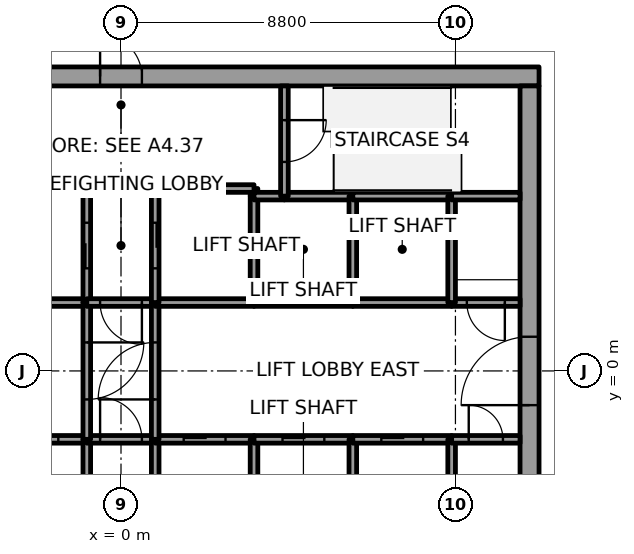
"""IFC4 building model, lengths in metres.
Left out: names, types, materials, properties, quantities, classifications, styles, units other than length and angle.
Written with IfcOpenShell. Run it as: python <this file> out.ifc"""

import sys

from ifc_helpers import new_model, si_unit, direction, frame, frame_2d, origin, place, context, subcontext, project, spatial, rectangle, extrude, element, fill, save


model = new_model("IFC4")
c1 = context("Model", 3, precision=1e-05, world=origin(), true_north=direction((0.0, 1.0)))
c2 = subcontext(c1, "Body", "Model", "MODEL_VIEW")
j1 = project(units=[si_unit("LENGTHUNIT", "METRE"), si_unit("PLANEANGLEUNIT", "RADIAN")], contexts=[c1])
p1 = place(None, origin())
s1 = spatial("IfcSite", under=j1, at=p1, CompositionType="ELEMENT")
p2 = place(p1, origin())
s2 = spatial("IfcBuilding", under=s1, at=p2, CompositionType="ELEMENT")
p3 = place(p2, frame((0.0, 0.0, 161.8)))
s3 = spatial("IfcBuildingStorey", under=s2, at=p3, CompositionType="ELEMENT", Elevation=161.8)
p4 = place(p3, frame((-11.0, 7.75, 0.0), z_axis=(0.0, 0.0, 1.0), x_axis=(1.0, 0.0, 0.0)))
e1 = element("IfcWall", 1, at=p4, inside=s3, PredefinedType="SHEAR", context=c2, shape_type="SweptSolid", body=[
    extrude(rectangle(XDim=22.0, YDim=0.5, at=frame_2d((11.0, 0.0))), origin(), (0.0, 0.0, 1.0), 4.0),
])
p5 = place(p4, frame((10.45, 0.0, 0.0)))
e2 = element("IfcOpeningElement", 2, at=p5, cuts=e1, PredefinedType="OPENING", context=c2, shape_type="SweptSolid", body=[
    extrude(rectangle(XDim=1.1, YDim=2.1, at=frame_2d((0.55, 1.05))), frame((0.0, 0.25, 0.0), z_axis=(0.0, -1.0, 0.0), x_axis=(1.0, 0.0, 0.0)), (0.0, 0.0, 1.0), 0.5),
])
p6 = place(p3, frame((10.75, -7.5, 0.0), z_axis=(0.0, 0.0, 1.0), x_axis=(0.0, 1.0, 0.0)))
e3 = element("IfcWall", 3, at=p6, inside=s3, PredefinedType="SHEAR", context=c2, shape_type="SweptSolid", body=[
    extrude(rectangle(XDim=15.0, YDim=0.5, at=frame_2d((7.5, 0.0))), origin(), (0.0, 0.0, 1.0), 4.0),
])
p7 = place(p6, frame((6.6, 0.0, 0.0)))
e4 = element("IfcOpeningElement", 4, at=p7, cuts=e3, PredefinedType="OPENING", context=c2, shape_type="SweptSolid", body=[
    extrude(rectangle(XDim=1.8, YDim=2.1, at=frame_2d((0.9, 1.05))), frame((0.0, 0.25, 0.0), z_axis=(0.0, -1.0, 0.0), x_axis=(1.0, 0.0, 0.0)), (0.0, 0.0, 1.0), 0.5),
])
p8 = place(p3, frame((-3.5, -1.8, 0.0), z_axis=(0.0, 0.0, 1.0), x_axis=(1.0, 0.0, 0.0)))
e5 = element("IfcWall", 5, at=p8, inside=s3, PredefinedType="SOLIDWALL", context=c2, shape_type="SweptSolid", body=[
    extrude(rectangle(XDim=2.6, YDim=0.2, at=frame_2d((1.3, 0.0))), origin(), (0.0, 0.0, 1.0), 3.85),
])
p9 = place(p8, frame((0.75, 0.0, 0.0)))
e6 = element("IfcOpeningElement", 6, at=p9, cuts=e5, PredefinedType="OPENING", context=c2, shape_type="SweptSolid", body=[
    extrude(rectangle(XDim=1.1, YDim=2.1, at=frame_2d((0.55, 1.05))), frame((0.0, 0.1, 0.0), z_axis=(0.0, -1.0, 0.0), x_axis=(1.0, 0.0, 0.0)), (0.0, 0.0, 1.0), 0.2),
])
p10 = place(p3, frame((-0.9, 1.8, 0.0), z_axis=(0.0, 0.0, 1.0), x_axis=(-1.0, 0.0, 0.0)))
e7 = element("IfcWall", 7, at=p10, inside=s3, PredefinedType="SOLIDWALL", context=c2, shape_type="SweptSolid", body=[
    extrude(rectangle(XDim=2.6, YDim=0.2, at=frame_2d((1.3, 0.0))), origin(), (0.0, 0.0, 1.0), 3.85),
])
p11 = place(p3, frame((-0.9, 1.8, 0.0), z_axis=(0.0, 0.0, 1.0), x_axis=(0.0, 1.0, 0.0)))
e8 = element("IfcWall", 8, at=p11, inside=s3, PredefinedType="SOLIDWALL", context=c2, shape_type="SweptSolid", body=[
    extrude(rectangle(XDim=3.0, YDim=0.2, at=frame_2d((1.5, 0.0))), origin(), (0.0, 0.0, 1.0), 3.85),
])
p12 = place(p11, frame((0.9, 0.0, 0.0)))
e9 = element("IfcOpeningElement", 9, at=p12, cuts=e8, PredefinedType="OPENING", context=c2, shape_type="SweptSolid", body=[
    extrude(rectangle(XDim=1.2, YDim=2.1, at=frame_2d((0.6, 1.05))), frame((0.0, 0.1, 0.0), z_axis=(0.0, -1.0, 0.0), x_axis=(1.0, 0.0, 0.0)), (0.0, 0.0, 1.0), 0.2),
])
p13 = place(p3, frame((-0.9, 4.8, 0.0), z_axis=(0.0, 0.0, 1.0), x_axis=(-1.0, 0.0, 0.0)))
e10 = element("IfcWall", 10, at=p13, inside=s3, PredefinedType="SOLIDWALL", context=c2, shape_type="SweptSolid", body=[
    extrude(rectangle(XDim=2.6, YDim=0.2, at=frame_2d((1.3, 0.0))), origin(), (0.0, 0.0, 1.0), 3.85),
])
p14 = place(p3, frame((-0.9, -4.6, 0.0), z_axis=(0.0, 0.0, 1.0), x_axis=(0.0, 1.0, 0.0)))
e11 = element("IfcWall", 11, at=p14, inside=s3, PredefinedType="SOLIDWALL", context=c2, shape_type="SweptSolid", body=[
    extrude(rectangle(XDim=2.8, YDim=0.2, at=frame_2d((1.4, 0.0))), origin(), (0.0, 0.0, 1.0), 3.85),
])
p15 = place(p3, frame((-0.9, -1.8, 0.0), z_axis=(0.0, 0.0, 1.0), x_axis=(1.0, 0.0, 0.0)))
e12 = element("IfcWall", 12, at=p15, inside=s3, PredefinedType="SOLIDWALL", context=c2, shape_type="SweptSolid", body=[
    extrude(rectangle(XDim=1.8, YDim=0.2, at=frame_2d((0.9, 0.0))), origin(), (0.0, 0.0, 1.0), 3.85),
])
p16 = place(p15, frame((0.35, 0.0, 0.0)))
e13 = element("IfcOpeningElement", 13, at=p16, cuts=e12, PredefinedType="OPENING", context=c2, shape_type="SweptSolid", body=[
    extrude(rectangle(XDim=1.1, YDim=2.1, at=frame_2d((0.55, 1.05))), frame((0.0, 0.1, 0.0), z_axis=(0.0, -1.0, 0.0), x_axis=(1.0, 0.0, 0.0)), (0.0, 0.0, 1.0), 0.2),
])
p17 = place(p3, frame((-0.9, 1.8, 0.0), z_axis=(0.0, 0.0, 1.0), x_axis=(0.0, -1.0, 0.0)))
e14 = element("IfcWall", 14, at=p17, inside=s3, PredefinedType="SOLIDWALL", context=c2, shape_type="SweptSolid", body=[
    extrude(rectangle(XDim=3.6, YDim=0.2, at=frame_2d((1.8, 0.0))), origin(), (0.0, 0.0, 1.0), 3.85),
])
p18 = place(p17, frame((1.05, 0.0, 0.0)))
e15 = element("IfcOpeningElement", 15, at=p18, cuts=e14, PredefinedType="OPENING", context=c2, shape_type="SweptSolid", body=[
    extrude(rectangle(XDim=1.5, YDim=2.1, at=frame_2d((0.75, 1.05))), frame((0.0, 0.1, 0.0), z_axis=(0.0, -1.0, 0.0), x_axis=(1.0, 0.0, 0.0)), (0.0, 0.0, 1.0), 0.2),
])
p19 = place(p3, frame((0.9, 1.8, 0.0), z_axis=(0.0, 0.0, 1.0), x_axis=(-1.0, 0.0, 0.0)))
e16 = element("IfcWall", 16, at=p19, inside=s3, PredefinedType="SOLIDWALL", context=c2, shape_type="SweptSolid", body=[
    extrude(rectangle(XDim=1.8, YDim=0.2, at=frame_2d((0.9, 0.0))), origin(), (0.0, 0.0, 1.0), 3.85),
])
p20 = place(p19, frame((0.35, 0.0, 0.0)))
e17 = element("IfcOpeningElement", 17, at=p20, cuts=e16, PredefinedType="OPENING", context=c2, shape_type="SweptSolid", body=[
    extrude(rectangle(XDim=1.1, YDim=2.1, at=frame_2d((0.55, 1.05))), frame((0.0, 0.1, 0.0), z_axis=(0.0, -1.0, 0.0), x_axis=(1.0, 0.0, 0.0)), (0.0, 0.0, 1.0), 0.2),
])
p21 = place(p3, frame((0.9, -1.8, 0.0), z_axis=(0.0, 0.0, 1.0), x_axis=(0.0, -1.0, 0.0)))
e18 = element("IfcWall", 18, at=p21, inside=s3, PredefinedType="SOLIDWALL", context=c2, shape_type="SweptSolid", body=[
    extrude(rectangle(XDim=2.8, YDim=0.2, at=frame_2d((1.4, 0.0))), origin(), (0.0, 0.0, 1.0), 3.85),
])
p22 = place(p3, frame((0.9, -1.8, 0.0), z_axis=(0.0, 0.0, 1.0), x_axis=(1.0, 0.0, 0.0)))
e19 = element("IfcWall", 19, at=p22, inside=s3, PredefinedType="SOLIDWALL", context=c2, shape_type="SweptSolid", body=[
    extrude(rectangle(XDim=2.6, YDim=0.2, at=frame_2d((1.3, 0.0))), origin(), (0.0, 0.0, 1.0), 3.85),
])
p23 = place(p22, frame((0.75, 0.0, 0.0)))
e20 = element("IfcOpeningElement", 20, at=p23, cuts=e19, PredefinedType="OPENING", context=c2, shape_type="SweptSolid", body=[
    extrude(rectangle(XDim=1.1, YDim=2.1, at=frame_2d((0.55, 1.05))), frame((0.0, 0.1, 0.0), z_axis=(0.0, -1.0, 0.0), x_axis=(1.0, 0.0, 0.0)), (0.0, 0.0, 1.0), 0.2),
])
p24 = place(p3, frame((0.9, -1.8, 0.0), z_axis=(0.0, 0.0, 1.0), x_axis=(0.0, 1.0, 0.0)))
e21 = element("IfcWall", 21, at=p24, inside=s3, PredefinedType="SOLIDWALL", context=c2, shape_type="SweptSolid", body=[
    extrude(rectangle(XDim=3.6, YDim=0.2, at=frame_2d((1.8, 0.0))), origin(), (0.0, 0.0, 1.0), 3.85),
])
p25 = place(p24, frame((1.05, 0.0, 0.0)))
e22 = element("IfcOpeningElement", 22, at=p25, cuts=e21, PredefinedType="OPENING", context=c2, shape_type="SweptSolid", body=[
    extrude(rectangle(XDim=1.5, YDim=2.1, at=frame_2d((0.75, 1.05))), frame((0.0, 0.1, 0.0), z_axis=(0.0, -1.0, 0.0), x_axis=(1.0, 0.0, 0.0)), (0.0, 0.0, 1.0), 0.2),
])
p26 = place(p3, frame((3.5, 1.8, 0.0), z_axis=(0.0, 0.0, 1.0), x_axis=(-1.0, 0.0, 0.0)))
e23 = element("IfcWall", 23, at=p26, inside=s3, PredefinedType="SOLIDWALL", context=c2, shape_type="SweptSolid", body=[
    extrude(rectangle(XDim=2.6, YDim=0.2, at=frame_2d((1.3, 0.0))), origin(), (0.0, 0.0, 1.0), 3.85),
])
p27 = place(p3, frame((3.5, 4.6, 0.0), z_axis=(0.0, 0.0, 1.0), x_axis=(0.0, 1.0, 0.0)))
e24 = element("IfcWall", 24, at=p27, inside=s3, PredefinedType="SOLIDWALL", context=c2, shape_type="SweptSolid", body=[
    extrude(rectangle(XDim=0.2, YDim=0.2, at=frame_2d((0.1, 0.0))), origin(), (0.0, 0.0, 1.0), 3.85),
])
p28 = place(p3, frame((3.5, 4.8, 0.0), z_axis=(0.0, 0.0, 1.0), x_axis=(-1.0, 0.0, 0.0)))
e25 = element("IfcWall", 25, at=p28, inside=s3, PredefinedType="SOLIDWALL", context=c2, shape_type="SweptSolid", body=[
    extrude(rectangle(XDim=2.6, YDim=0.2, at=frame_2d((1.3, 0.0))), origin(), (0.0, 0.0, 1.0), 3.85),
])
p29 = place(p3, frame((0.9, 4.8, 0.0), z_axis=(0.0, 0.0, 1.0), x_axis=(0.0, -1.0, 0.0)))
e26 = element("IfcWall", 26, at=p29, inside=s3, PredefinedType="SOLIDWALL", context=c2, shape_type="SweptSolid", body=[
    extrude(rectangle(XDim=3.0, YDim=0.2, at=frame_2d((1.5, 0.0))), origin(), (0.0, 0.0, 1.0), 3.85),
])
p30 = place(p29, frame((0.9, 0.0, 0.0)))
e27 = element("IfcOpeningElement", 27, at=p30, cuts=e26, PredefinedType="OPENING", context=c2, shape_type="SweptSolid", body=[
    extrude(rectangle(XDim=1.2, YDim=2.1, at=frame_2d((0.6, 1.05))), frame((0.0, 0.1, 0.0), z_axis=(0.0, -1.0, 0.0), x_axis=(1.0, 0.0, 0.0)), (0.0, 0.0, 1.0), 0.2),
])
p31 = place(p3, frame((3.5, -4.6, 0.0), z_axis=(0.0, 0.0, 1.0), x_axis=(0.0, 1.0, 0.0)))
e28 = element("IfcWall", 28, at=p31, inside=s3, PredefinedType="SOLIDWALL", context=c2, shape_type="SweptSolid", body=[
    extrude(rectangle(XDim=2.8, YDim=0.2, at=frame_2d((1.4, 0.0))), origin(), (0.0, 0.0, 1.0), 3.85),
])
p32 = place(p3, frame((3.5, -1.8, 0.0), z_axis=(0.0, 0.0, 1.0), x_axis=(1.0, 0.0, 0.0)))
e29 = element("IfcWall", 29, at=p32, inside=s3, PredefinedType="SOLIDWALL", context=c2, shape_type="SweptSolid", body=[
    extrude(rectangle(XDim=2.6, YDim=0.2, at=frame_2d((1.3, 0.0))), origin(), (0.0, 0.0, 1.0), 3.85),
])
p33 = place(p32, frame((0.75, 0.0, 0.0)))
e30 = element("IfcOpeningElement", 30, at=p33, cuts=e29, PredefinedType="OPENING", context=c2, shape_type="SweptSolid", body=[
    extrude(rectangle(XDim=1.1, YDim=2.1, at=frame_2d((0.55, 1.05))), frame((0.0, 0.1, 0.0), z_axis=(0.0, -1.0, 0.0), x_axis=(1.0, 0.0, 0.0)), (0.0, 0.0, 1.0), 0.2),
])
p34 = place(p3, frame((6.1, 1.8, 0.0), z_axis=(0.0, 0.0, 1.0), x_axis=(-1.0, 0.0, 0.0)))
e31 = element("IfcWall", 31, at=p34, inside=s3, PredefinedType="SOLIDWALL", context=c2, shape_type="SweptSolid", body=[
    extrude(rectangle(XDim=2.6, YDim=0.2, at=frame_2d((1.3, 0.0))), origin(), (0.0, 0.0, 1.0), 3.85),
])
p35 = place(p3, frame((3.5, 1.8, 0.0), z_axis=(0.0, 0.0, 1.0), x_axis=(0.0, 1.0, 0.0)))
e32 = element("IfcWall", 32, at=p35, inside=s3, PredefinedType="SOLIDWALL", context=c2, shape_type="SweptSolid", body=[
    extrude(rectangle(XDim=2.8, YDim=0.2, at=frame_2d((1.4, 0.0))), origin(), (0.0, 0.0, 1.0), 3.85),
])
p36 = place(p3, frame((4.3, 4.6, 0.0), z_axis=(0.0, 0.0, 1.0), x_axis=(-1.0, 0.0, 0.0)))
e33 = element("IfcWall", 33, at=p36, inside=s3, PredefinedType="SOLIDWALL", context=c2, shape_type="SweptSolid", body=[
    extrude(rectangle(XDim=0.8, YDim=0.2, at=frame_2d((0.4, 0.0))), origin(), (0.0, 0.0, 1.0), 3.85),
])
p37 = place(p3, frame((6.1, 4.6, 0.0), z_axis=(0.0, 0.0, 1.0), x_axis=(-1.0, 0.0, 0.0)))
e34 = element("IfcWall", 34, at=p37, inside=s3, PredefinedType="SOLIDWALL", context=c2, shape_type="SweptSolid", body=[
    extrude(rectangle(XDim=1.8, YDim=0.2, at=frame_2d((0.9, 0.0))), origin(), (0.0, 0.0, 1.0), 3.85),
])
p38 = place(p3, frame((4.3, 7.5, 0.0), z_axis=(0.0, 0.0, 1.0), x_axis=(0.0, -1.0, 0.0)))
e35 = element("IfcWall", 35, at=p38, inside=s3, PredefinedType="SOLIDWALL", context=c2, shape_type="SweptSolid", body=[
    extrude(rectangle(XDim=2.9, YDim=0.2, at=frame_2d((1.45, 0.0))), origin(), (0.0, 0.0, 1.0), 3.85),
])
p39 = place(p38, frame((0.9, 0.0, 0.0)))
e36 = element("IfcOpeningElement", 36, at=p39, cuts=e35, PredefinedType="OPENING", context=c2, shape_type="SweptSolid", body=[
    extrude(rectangle(XDim=1.1, YDim=2.1, at=frame_2d((0.55, 1.05))), frame((0.0, 0.1, 0.0), z_axis=(0.0, -1.0, 0.0), x_axis=(1.0, 0.0, 0.0)), (0.0, 0.0, 1.0), 0.2),
])
p40 = place(p3, frame((6.1, -4.6, 0.0), z_axis=(0.0, 0.0, 1.0), x_axis=(0.0, 1.0, 0.0)))
e37 = element("IfcWall", 37, at=p40, inside=s3, PredefinedType="SOLIDWALL", context=c2, shape_type="SweptSolid", body=[
    extrude(rectangle(XDim=2.8, YDim=0.2, at=frame_2d((1.4, 0.0))), origin(), (0.0, 0.0, 1.0), 3.85),
])
p41 = place(p3, frame((6.1, -1.8, 0.0), z_axis=(0.0, 0.0, 1.0), x_axis=(1.0, 0.0, 0.0)))
e38 = element("IfcWall", 38, at=p41, inside=s3, PredefinedType="SOLIDWALL", context=c2, shape_type="SweptSolid", body=[
    extrude(rectangle(XDim=2.6, YDim=0.2, at=frame_2d((1.3, 0.0))), origin(), (0.0, 0.0, 1.0), 3.85),
])
p42 = place(p41, frame((0.75, 0.0, 0.0)))
e39 = element("IfcOpeningElement", 39, at=p42, cuts=e38, PredefinedType="OPENING", context=c2, shape_type="SweptSolid", body=[
    extrude(rectangle(XDim=1.1, YDim=2.1, at=frame_2d((0.55, 1.05))), frame((0.0, 0.1, 0.0), z_axis=(0.0, -1.0, 0.0), x_axis=(1.0, 0.0, 0.0)), (0.0, 0.0, 1.0), 0.2),
])
p43 = place(p3, frame((8.7, 1.8, 0.0), z_axis=(0.0, 0.0, 1.0), x_axis=(-1.0, 0.0, 0.0)))
e40 = element("IfcWall", 40, at=p43, inside=s3, PredefinedType="SOLIDWALL", context=c2, shape_type="SweptSolid", body=[
    extrude(rectangle(XDim=2.6, YDim=0.2, at=frame_2d((1.3, 0.0))), origin(), (0.0, 0.0, 1.0), 3.85),
])
p44 = place(p3, frame((6.1, 1.8, 0.0), z_axis=(0.0, 0.0, 1.0), x_axis=(0.0, 1.0, 0.0)))
e41 = element("IfcWall", 41, at=p44, inside=s3, PredefinedType="SOLIDWALL", context=c2, shape_type="SweptSolid", body=[
    extrude(rectangle(XDim=2.8, YDim=0.2, at=frame_2d((1.4, 0.0))), origin(), (0.0, 0.0, 1.0), 3.85),
])
p45 = place(p3, frame((8.7, 4.6, 0.0), z_axis=(0.0, 0.0, 1.0), x_axis=(-1.0, 0.0, 0.0)))
e42 = element("IfcWall", 42, at=p45, inside=s3, PredefinedType="SOLIDWALL", context=c2, shape_type="SweptSolid", body=[
    extrude(rectangle(XDim=2.6, YDim=0.2, at=frame_2d((1.3, 0.0))), origin(), (0.0, 0.0, 1.0), 3.85),
])
p46 = place(p3, frame((8.7, -1.8, 0.0), z_axis=(0.0, 0.0, 1.0), x_axis=(0.0, -1.0, 0.0)))
e43 = element("IfcWall", 43, at=p46, inside=s3, PredefinedType="SOLIDWALL", context=c2, shape_type="SweptSolid", body=[
    extrude(rectangle(XDim=2.8, YDim=0.2, at=frame_2d((1.4, 0.0))), origin(), (0.0, 0.0, 1.0), 3.85),
])
p47 = place(p3, frame((8.7, -1.8, 0.0), z_axis=(0.0, 0.0, 1.0), x_axis=(1.0, 0.0, 0.0)))
e44 = element("IfcWall", 44, at=p47, inside=s3, PredefinedType="SOLIDWALL", context=c2, shape_type="SweptSolid", body=[
    extrude(rectangle(XDim=1.8, YDim=0.2, at=frame_2d((0.9, 0.0))), origin(), (0.0, 0.0, 1.0), 3.85),
])
p48 = place(p47, frame((0.45, 0.0, 0.0)))
e45 = element("IfcOpeningElement", 45, at=p48, cuts=e44, PredefinedType="OPENING", context=c2, shape_type="SweptSolid", body=[
    extrude(rectangle(XDim=0.9, YDim=2.1, at=frame_2d((0.45, 1.05))), frame((0.0, 0.1, 0.0), z_axis=(0.0, -1.0, 0.0), x_axis=(1.0, 0.0, 0.0)), (0.0, 0.0, 1.0), 0.2),
])
p49 = place(p3, frame((10.5, 1.8, 0.0), z_axis=(0.0, 0.0, 1.0), x_axis=(-1.0, 0.0, 0.0)))
e46 = element("IfcWall", 46, at=p49, inside=s3, PredefinedType="SOLIDWALL", context=c2, shape_type="SweptSolid", body=[
    extrude(rectangle(XDim=1.8, YDim=0.2, at=frame_2d((0.9, 0.0))), origin(), (0.0, 0.0, 1.0), 3.85),
])
p50 = place(p49, frame((0.4, 0.0, 0.0)))
e47 = element("IfcOpeningElement", 47, at=p50, cuts=e46, PredefinedType="OPENING", context=c2, shape_type="SweptSolid", body=[
    extrude(rectangle(XDim=1.0, YDim=2.1, at=frame_2d((0.5, 1.05))), frame((0.0, 0.1, 0.0), z_axis=(0.0, -1.0, 0.0), x_axis=(1.0, 0.0, 0.0)), (0.0, 0.0, 1.0), 0.2),
])
p51 = place(p3, frame((8.7, 4.6, 0.0), z_axis=(0.0, 0.0, 1.0), x_axis=(0.0, -1.0, 0.0)))
e48 = element("IfcWall", 48, at=p51, inside=s3, PredefinedType="SOLIDWALL", context=c2, shape_type="SweptSolid", body=[
    extrude(rectangle(XDim=2.8, YDim=0.2, at=frame_2d((1.4, 0.0))), origin(), (0.0, 0.0, 1.0), 3.85),
])
p52 = place(p3, frame((10.5, 4.6, 0.0), z_axis=(0.0, 0.0, 1.0), x_axis=(-1.0, 0.0, 0.0)))
e49 = element("IfcWall", 49, at=p52, inside=s3, PredefinedType="SOLIDWALL", context=c2, shape_type="SweptSolid", body=[
    extrude(rectangle(XDim=1.8, YDim=0.2, at=frame_2d((0.9, 0.0))), origin(), (0.0, 0.0, 1.0), 3.85),
])
p53 = place(p9, origin())
e50 = element("IfcDoor", 50, at=p53, inside=s3, OperationType="SLIDING_TO_RIGHT", PredefinedType="DOOR", context=c2, shape_type="SweptSolid", body=[
    extrude(rectangle(XDim=1.1, YDim=2.1, at=frame_2d((0.55, 1.05))), frame((0.0, 0.025, 0.0), z_axis=(0.0, -1.0, 0.0), x_axis=(1.0, 0.0, 0.0)), (0.0, 0.0, 1.0), 0.05),
])
fill(e6, e50)
p54 = place(p23, origin())
e51 = element("IfcDoor", 51, at=p54, inside=s3, OperationType="SLIDING_TO_RIGHT", PredefinedType="DOOR", context=c2, shape_type="SweptSolid", body=[
    extrude(rectangle(XDim=1.1, YDim=2.1, at=frame_2d((0.55, 1.05))), frame((0.0, 0.025, 0.0), z_axis=(0.0, -1.0, 0.0), x_axis=(1.0, 0.0, 0.0)), (0.0, 0.0, 1.0), 0.05),
])
fill(e20, e51)
p55 = place(p33, origin())
e52 = element("IfcDoor", 52, at=p55, inside=s3, OperationType="SLIDING_TO_LEFT", PredefinedType="DOOR", context=c2, shape_type="SweptSolid", body=[
    extrude(rectangle(XDim=1.1, YDim=2.1, at=frame_2d((0.55, 1.05))), frame((0.0, 0.025, 0.0), z_axis=(0.0, -1.0, 0.0), x_axis=(1.0, 0.0, 0.0)), (0.0, 0.0, 1.0), 0.05),
])
fill(e30, e52)
p56 = place(p42, origin())
e53 = element("IfcDoor", 53, at=p56, inside=s3, OperationType="SLIDING_TO_RIGHT", PredefinedType="DOOR", context=c2, shape_type="SweptSolid", body=[
    extrude(rectangle(XDim=1.1, YDim=2.1, at=frame_2d((0.55, 1.05))), frame((0.0, 0.025, 0.0), z_axis=(0.0, -1.0, 0.0), x_axis=(1.0, 0.0, 0.0)), (0.0, 0.0, 1.0), 0.05),
])
fill(e39, e53)
p57 = place(p12, origin())
e54 = element("IfcDoor", 54, at=p57, inside=s3, OperationType="SLIDING_TO_RIGHT", PredefinedType="DOOR", context=c2, shape_type="SweptSolid", body=[
    extrude(rectangle(XDim=1.2, YDim=2.1, at=frame_2d((0.6, 1.05))), frame((0.0, 0.025, 0.0), z_axis=(0.0, -1.0, 0.0), x_axis=(1.0, 0.0, 0.0)), (0.0, 0.0, 1.0), 0.05),
])
fill(e9, e54)
p58 = place(p30, origin())
e55 = element("IfcDoor", 55, at=p58, inside=s3, OperationType="SLIDING_TO_RIGHT", PredefinedType="DOOR", context=c2, shape_type="SweptSolid", body=[
    extrude(rectangle(XDim=1.2, YDim=2.1, at=frame_2d((0.6, 1.05))), frame((0.0, 0.025, 0.0), z_axis=(0.0, -1.0, 0.0), x_axis=(1.0, 0.0, 0.0)), (0.0, 0.0, 1.0), 0.05),
])
fill(e27, e55)
p59 = place(p18, origin())
e56 = element("IfcDoor", 56, at=p59, inside=s3, OperationType="DOUBLE_DOOR_SINGLE_SWING", PredefinedType="DOOR", context=c2, shape_type="SweptSolid", body=[
    extrude(rectangle(XDim=1.5, YDim=2.1, at=frame_2d((0.75, 1.05))), frame((0.0, 0.025, 0.0), z_axis=(0.0, -1.0, 0.0), x_axis=(1.0, 0.0, 0.0)), (0.0, 0.0, 1.0), 0.05),
])
fill(e15, e56)
p60 = place(p25, origin())
e57 = element("IfcDoor", 57, at=p60, inside=s3, OperationType="DOUBLE_DOOR_SINGLE_SWING", PredefinedType="DOOR", context=c2, shape_type="SweptSolid", body=[
    extrude(rectangle(XDim=1.5, YDim=2.1, at=frame_2d((0.75, 1.05))), frame((0.0, 0.025, 0.0), z_axis=(0.0, -1.0, 0.0), x_axis=(1.0, 0.0, 0.0)), (0.0, 0.0, 1.0), 0.05),
])
fill(e22, e57)
p61 = place(p20, origin())
e58 = element("IfcDoor", 58, at=p61, inside=s3, OperationType="SINGLE_SWING_LEFT", PredefinedType="DOOR", context=c2, shape_type="SweptSolid", body=[
    extrude(rectangle(XDim=1.1, YDim=2.1, at=frame_2d((0.55, 1.05))), frame((0.0, 0.025, 0.0), z_axis=(0.0, -1.0, 0.0), x_axis=(1.0, 0.0, 0.0)), (0.0, 0.0, 1.0), 0.05),
])
fill(e17, e58)
p62 = place(p16, origin())
e59 = element("IfcDoor", 59, at=p62, inside=s3, OperationType="SINGLE_SWING_LEFT", PredefinedType="DOOR", context=c2, shape_type="SweptSolid", body=[
    extrude(rectangle(XDim=1.1, YDim=2.1, at=frame_2d((0.55, 1.05))), frame((0.0, 0.025, 0.0), z_axis=(0.0, -1.0, 0.0), x_axis=(1.0, 0.0, 0.0)), (0.0, 0.0, 1.0), 0.05),
])
fill(e13, e59)
p63 = place(p50, origin())
e60 = element("IfcDoor", 60, at=p63, inside=s3, OperationType="SINGLE_SWING_LEFT", PredefinedType="DOOR", context=c2, shape_type="SweptSolid", body=[
    extrude(rectangle(XDim=1.0, YDim=2.1, at=frame_2d((0.5, 1.05))), frame((0.0, 0.025, 0.0), z_axis=(0.0, -1.0, 0.0), x_axis=(1.0, 0.0, 0.0)), (0.0, 0.0, 1.0), 0.05),
])
fill(e47, e60)
p64 = place(p39, origin())
e61 = element("IfcDoor", 61, at=p64, inside=s3, OperationType="SINGLE_SWING_LEFT", PredefinedType="DOOR", context=c2, shape_type="SweptSolid", body=[
    extrude(rectangle(XDim=1.1, YDim=2.1, at=frame_2d((0.55, 1.05))), frame((0.0, 0.025, 0.0), z_axis=(0.0, -1.0, 0.0), x_axis=(1.0, 0.0, 0.0)), (0.0, 0.0, 1.0), 0.05),
])
fill(e36, e61)
p65 = place(p48, origin())
e62 = element("IfcDoor", 62, at=p65, inside=s3, OperationType="SINGLE_SWING_RIGHT", PredefinedType="DOOR", context=c2, shape_type="SweptSolid", body=[
    extrude(rectangle(XDim=0.9, YDim=2.1, at=frame_2d((0.45, 1.05))), frame((0.0, 0.025, 0.0), z_axis=(0.0, -1.0, 0.0), x_axis=(1.0, 0.0, 0.0)), (0.0, 0.0, 1.0), 0.05),
])
fill(e45, e62)
p66 = place(p7, origin())
e63 = element("IfcDoor", 63, at=p66, inside=s3, OperationType="DOUBLE_DOOR_SINGLE_SWING", PredefinedType="DOOR", context=c2, shape_type="SweptSolid", body=[
    extrude(rectangle(XDim=1.8, YDim=2.1, at=frame_2d((0.9, 1.05))), frame((0.0, 0.025, 0.0), z_axis=(0.0, -1.0, 0.0), x_axis=(1.0, 0.0, 0.0)), (0.0, 0.0, 1.0), 0.05),
])
fill(e4, e63)
p67 = place(p5, origin())
e64 = element("IfcDoor", 64, at=p67, inside=s3, OperationType="SINGLE_SWING_LEFT", PredefinedType="DOOR", context=c2, shape_type="SweptSolid", body=[
    extrude(rectangle(XDim=1.1, YDim=2.1, at=frame_2d((0.55, 1.05))), frame((0.0, 0.025, 0.0), z_axis=(0.0, -1.0, 0.0), x_axis=(1.0, 0.0, 0.0)), (0.0, 0.0, 1.0), 0.05),
])
fill(e2, e64)
save(model, sys.argv[1])
